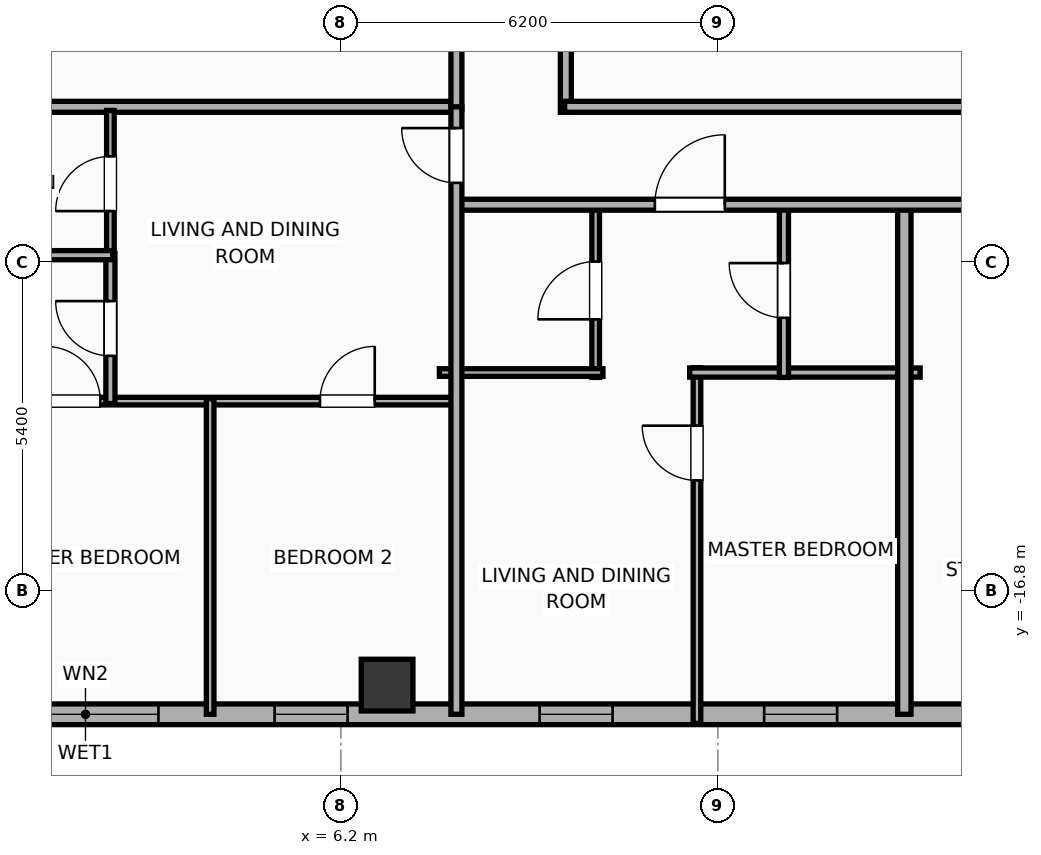
"""IFC4 building model, lengths in metres.
Left out: names, types, materials, properties, quantities, classifications, styles, units other than length and angle.
Written with IfcOpenShell. Run it as: python <this file> out.ifc"""

import sys

from ifc_helpers import new_model, si_unit, direction, frame, frame_2d, origin, origin_2d, place, context, subcontext, project, spatial, rectangle, hollow_rectangle, extrude, element, fill, save


model = new_model("IFC4")
c1 = context("Model", 3, precision=1e-05, world=origin(), true_north=direction((0.0, 1.0)))
c2 = subcontext(c1, "Body", "Model", "MODEL_VIEW")
j1 = project(units=[si_unit("LENGTHUNIT", "METRE"), si_unit("PLANEANGLEUNIT", "RADIAN")], contexts=[c1])
p1 = place(None, origin())
s1 = spatial("IfcSite", under=j1, at=p1, CompositionType="ELEMENT")
p2 = place(p1, origin())
s2 = spatial("IfcBuilding", under=s1, at=p2, CompositionType="ELEMENT")
p3 = place(p2, frame((0.0, 0.0, 227.5)))
s3 = spatial("IfcBuildingStorey", under=s2, at=p3, CompositionType="ELEMENT", Elevation=227.5)
p4 = place(p3, frame((6.96, -18.35, 0.0), z_axis=(0.0, 0.0, 1.0), x_axis=(1.0, 0.0, 0.0)))
e1 = element("IfcColumn", 1, at=p4, inside=s3, PredefinedType="COLUMN", context=c2, shape_type="SweptSolid", body=[
    extrude(hollow_rectangle(XDim=0.85, YDim=0.85, WallThickness=0.028, at=origin_2d()), origin(), (0.0, 0.0, 1.0), 3.9),
])
p5 = place(p3, frame((26.783, -18.83, 0.0), z_axis=(0.0, 0.0, 1.0), x_axis=(-1.0, 0.0, 0.0)))
e2 = element("IfcWall", 2, at=p5, inside=s3, PredefinedType="ELEMENTEDWALL", context=c2, shape_type="SweptSolid", body=[
    extrude(rectangle(XDim=49.566, YDim=0.34, at=frame_2d((24.783, 0.0))), origin(), (0.0, 0.0, 1.0), 3.65),
])
p6 = place(p5, frame((23.583, 0.0, 0.75)))
e3 = element("IfcOpeningElement", 3, at=p6, cuts=e2, PredefinedType="OPENING", context=c2, shape_type="SweptSolid", body=[
    extrude(rectangle(XDim=2.4, YDim=2.1, at=frame_2d((1.2, 1.05))), frame((0.0, 0.18, 0.0), z_axis=(0.0, -1.0, 0.0), x_axis=(1.0, 0.0, 0.0)), (0.0, 0.0, 1.0), 0.36),
])
p7 = place(p5, frame((41.756, 0.0, 0.75)))
e4 = element("IfcOpeningElement", 4, at=p7, cuts=e2, PredefinedType="OPENING", context=c2, shape_type="SweptSolid", body=[
    extrude(rectangle(XDim=2.4, YDim=2.1, at=frame_2d((1.2, 1.05))), frame((0.0, 0.18, 0.0), z_axis=(0.0, -1.0, 0.0), x_axis=(1.0, 0.0, 0.0)), (0.0, 0.0, 1.0), 0.36),
])
p8 = place(p5, frame((47.222, 0.0, 0.75)))
e5 = element("IfcOpeningElement", 5, at=p8, cuts=e2, PredefinedType="OPENING", context=c2, shape_type="SweptSolid", body=[
    extrude(rectangle(XDim=1.2, YDim=2.05, at=frame_2d((0.6, 1.025))), frame((0.0, 0.18, 0.0), z_axis=(0.0, -1.0, 0.0), x_axis=(1.0, 0.0, 0.0)), (0.0, 0.0, 1.0), 0.36),
])
p9 = place(p5, frame((45.181, 0.0, 0.75)))
e6 = element("IfcOpeningElement", 6, at=p9, cuts=e2, PredefinedType="OPENING", context=c2, shape_type="SweptSolid", body=[
    extrude(rectangle(XDim=1.2, YDim=2.05, at=frame_2d((0.6, 1.025))), frame((0.0, 0.18, 0.0), z_axis=(0.0, -1.0, 0.0), x_axis=(1.0, 0.0, 0.0)), (0.0, 0.0, 1.0), 0.36),
])
p10 = place(p5, frame((37.289, 0.0, 0.75)))
e7 = element("IfcOpeningElement", 7, at=p10, cuts=e2, PredefinedType="OPENING", context=c2, shape_type="SweptSolid", body=[
    extrude(rectangle(XDim=1.2, YDim=2.05, at=frame_2d((0.6, 1.025))), frame((0.0, 0.18, 0.0), z_axis=(0.0, -1.0, 0.0), x_axis=(1.0, 0.0, 0.0)), (0.0, 0.0, 1.0), 0.36),
])
p11 = place(p5, frame((16.115, 0.0, 0.75)))
e8 = element("IfcOpeningElement", 8, at=p11, cuts=e2, PredefinedType="OPENING", context=c2, shape_type="SweptSolid", body=[
    extrude(rectangle(XDim=1.2, YDim=2.05, at=frame_2d((0.6, 1.025))), frame((0.0, 0.18, 0.0), z_axis=(0.0, -1.0, 0.0), x_axis=(1.0, 0.0, 0.0)), (0.0, 0.0, 1.0), 0.36),
])
p12 = place(p5, frame((12.422, 0.0, 0.75)))
e9 = element("IfcOpeningElement", 9, at=p12, cuts=e2, PredefinedType="OPENING", context=c2, shape_type="SweptSolid", body=[
    extrude(rectangle(XDim=1.2, YDim=2.05, at=frame_2d((0.6, 1.025))), frame((0.0, 0.18, 0.0), z_axis=(0.0, -1.0, 0.0), x_axis=(1.0, 0.0, 0.0)), (0.0, 0.0, 1.0), 0.36),
])
p13 = place(p5, frame((8.09, 0.0, 0.75)))
e10 = element("IfcOpeningElement", 10, at=p13, cuts=e2, PredefinedType="OPENING", context=c2, shape_type="SweptSolid", body=[
    extrude(rectangle(XDim=1.2, YDim=2.05, at=frame_2d((0.6, 1.025))), frame((0.0, 0.18, 0.0), z_axis=(0.0, -1.0, 0.0), x_axis=(1.0, 0.0, 0.0)), (0.0, 0.0, 1.0), 0.36),
])
p14 = place(p5, frame((4.637, 0.0, 0.75)))
e11 = element("IfcOpeningElement", 11, at=p14, cuts=e2, PredefinedType="OPENING", context=c2, shape_type="SweptSolid", body=[
    extrude(rectangle(XDim=1.2, YDim=2.05, at=frame_2d((0.6, 1.025))), frame((0.0, 0.18, 0.0), z_axis=(0.0, -1.0, 0.0), x_axis=(1.0, 0.0, 0.0)), (0.0, 0.0, 1.0), 0.36),
])
p15 = place(p5, frame((1.811, 0.0, 0.75)))
e12 = element("IfcOpeningElement", 12, at=p15, cuts=e2, PredefinedType="OPENING", context=c2, shape_type="SweptSolid", body=[
    extrude(rectangle(XDim=1.2, YDim=2.05, at=frame_2d((0.6, 1.025))), frame((0.0, 0.18, 0.0), z_axis=(0.0, -1.0, 0.0), x_axis=(1.0, 0.0, 0.0)), (0.0, 0.0, 1.0), 0.36),
])
p16 = place(p5, frame((32.253, 0.0, 0.75)))
e13 = element("IfcOpeningElement", 13, at=p16, cuts=e2, PredefinedType="OPENING", context=c2, shape_type="SweptSolid", body=[
    extrude(rectangle(XDim=1.2, YDim=2.05, at=frame_2d((0.6, 1.025))), frame((0.0, 0.18, 0.0), z_axis=(0.0, -1.0, 0.0), x_axis=(1.0, 0.0, 0.0)), (0.0, 0.0, 1.0), 0.36),
])
p17 = place(p5, frame((27.853, 0.0, 0.75)))
e14 = element("IfcOpeningElement", 14, at=p17, cuts=e2, PredefinedType="OPENING", context=c2, shape_type="SweptSolid", body=[
    extrude(rectangle(XDim=1.2, YDim=2.05, at=frame_2d((0.6, 1.025))), frame((0.0, 0.18, 0.0), z_axis=(0.0, -1.0, 0.0), x_axis=(1.0, 0.0, 0.0)), (0.0, 0.0, 1.0), 0.36),
])
p18 = place(p5, frame((20.473, 0.0, 0.75)))
e15 = element("IfcOpeningElement", 15, at=p18, cuts=e2, PredefinedType="OPENING", context=c2, shape_type="SweptSolid", body=[
    extrude(rectangle(XDim=1.2, YDim=2.05, at=frame_2d((0.6, 1.025))), frame((0.0, 0.18, 0.0), z_axis=(0.0, -1.0, 0.0), x_axis=(1.0, 0.0, 0.0)), (0.0, 0.0, 1.0), 0.36),
])
p19 = place(p3, frame((9.9, -8.93, 0.0), z_axis=(0.0, 0.0, 1.0), x_axis=(0.0, 1.0, 0.0)))
e16 = element("IfcWall", 16, at=p19, inside=s3, PredefinedType="PARTITIONING", context=c2, shape_type="SweptSolid", body=[
    extrude(rectangle(XDim=17.86, YDim=0.18, at=frame_2d((8.93, 0.0))), origin(), (0.0, 0.0, 1.0), 3.65),
])
p20 = place(p19, frame((7.487, 0.0, 0.0)))
e17 = element("IfcOpeningElement", 17, at=p20, cuts=e16, PredefinedType="OPENING", context=c2, shape_type="SweptSolid", body=[
    extrude(rectangle(XDim=1.1, YDim=2.05, at=frame_2d((0.55, 1.025))), frame((0.0, 0.1, 0.0), z_axis=(0.0, -1.0, 0.0), x_axis=(1.0, 0.0, 0.0)), (0.0, 0.0, 1.0), 0.2),
])
p21 = place(p3, frame((9.88, -8.84, 0.0), z_axis=(0.0, 0.0, 1.0), x_axis=(1.0, 0.0, 0.0)))
e18 = element("IfcWall", 18, at=p21, inside=s3, PredefinedType="PARTITIONING", context=c2, shape_type="SweptSolid", body=[
    extrude(rectangle(XDim=20.35, YDim=0.18, at=frame_2d((10.175, 0.0))), origin(), (0.0, 0.0, 1.0), 3.65),
])
p22 = place(p3, frame((-8.15, -8.84, 0.0), z_axis=(0.0, 0.0, 1.0), x_axis=(1.0, 0.0, 0.0)))
e19 = element("IfcWall", 19, at=p22, inside=s3, PredefinedType="PARTITIONING", context=c2, shape_type="SweptSolid", body=[
    extrude(rectangle(XDim=16.3, YDim=0.18, at=frame_2d((8.15, 0.0))), origin(), (0.0, 0.0, 1.0), 3.65),
])
p23 = place(p3, frame((8.1, -8.88, 0.0), z_axis=(0.0, 0.0, 1.0), x_axis=(0.0, 1.0, 0.0)))
e20 = element("IfcWall", 20, at=p23, inside=s3, PredefinedType="PARTITIONING", context=c2, shape_type="SweptSolid", body=[
    extrude(rectangle(XDim=17.76, YDim=0.18, at=frame_2d((8.88, 0.0))), origin(), (0.0, 0.0, 1.0), 3.65),
])
p24 = place(p3, frame((12.056, -18.98, 0.0), z_axis=(0.0, 0.0, 1.0), x_axis=(0.0, 1.0, 0.0)))
e21 = element("IfcWall", 21, at=p24, inside=s3, PredefinedType="PARTITIONING", context=c2, shape_type="SweptSolid", body=[
    extrude(rectangle(XDim=5.85, YDim=0.125, at=frame_2d((2.925, 0.0))), origin(), (0.0, 0.0, 1.0), 3.65),
])
p25 = place(p24, frame((3.996, 0.0, 0.0)))
e22 = element("IfcOpeningElement", 22, at=p25, cuts=e21, PredefinedType="OPENING", context=c2, shape_type="SweptSolid", body=[
    extrude(rectangle(XDim=0.9, YDim=2.05, at=frame_2d((0.45, 1.025))), frame((0.0, 0.073, 0.0), z_axis=(0.0, -1.0, 0.0), x_axis=(1.0, 0.0, 0.0)), (0.0, 0.0, 1.0), 0.145),
])
p26 = place(p3, frame((11.936, -13.21, 0.0), z_axis=(0.0, 0.0, 1.0), x_axis=(1.0, 0.0, 0.0)))
e23 = element("IfcWall", 23, at=p26, inside=s3, PredefinedType="PLUMBINGWALL", context=c2, shape_type="SweptSolid", body=[
    extrude(rectangle(XDim=3.79, YDim=0.15, at=frame_2d((1.895, 0.0))), origin(), (0.0, 0.0, 1.0), 3.65),
])
p27 = place(p3, frame((10.39, -13.29, 0.0), z_axis=(0.0, 0.0, 1.0), x_axis=(0.0, 1.0, 0.0)))
e24 = element("IfcWall", 24, at=p27, inside=s3, PredefinedType="PARTITIONING", context=c2, shape_type="SweptSolid", body=[
    extrude(rectangle(XDim=2.86, YDim=0.125, at=frame_2d((1.43, 0.0))), origin(), (0.0, 0.0, 1.0), 3.65),
])
p28 = place(p27, frame((0.955, 0.0, 0.0)))
e25 = element("IfcOpeningElement", 25, at=p28, cuts=e24, PredefinedType="OPENING", context=c2, shape_type="SweptSolid", body=[
    extrude(rectangle(XDim=0.95, YDim=2.05, at=frame_2d((0.475, 1.025))), frame((0.0, 0.073, 0.0), z_axis=(0.0, -1.0, 0.0), x_axis=(1.0, 0.0, 0.0)), (0.0, 0.0, 1.0), 0.145),
])
p29 = place(p3, frame((7.82, -13.21, 0.0), z_axis=(0.0, 0.0, 1.0), x_axis=(1.0, 0.0, 0.0)))
e26 = element("IfcWall", 26, at=p29, inside=s3, PredefinedType="PARTITIONING", context=c2, shape_type="SweptSolid", body=[
    extrude(rectangle(XDim=2.69, YDim=0.125, at=frame_2d((1.345, 0.0))), origin(), (0.0, 0.0, 1.0), 3.65),
])
p30 = place(p3, frame((13.486, -13.29, 0.0), z_axis=(0.0, 0.0, 1.0), x_axis=(0.0, 1.0, 0.0)))
e27 = element("IfcWall", 27, at=p30, inside=s3, PredefinedType="PLUMBINGWALL", context=c2, shape_type="SweptSolid", body=[
    extrude(rectangle(XDim=2.86, YDim=0.15, at=frame_2d((1.43, 0.0))), origin(), (0.0, 0.0, 1.0), 3.65),
])
p31 = place(p30, frame((0.98, 0.0, 0.0)))
e28 = element("IfcOpeningElement", 28, at=p31, cuts=e27, PredefinedType="OPENING", context=c2, shape_type="SweptSolid", body=[
    extrude(rectangle(XDim=0.9, YDim=2.05, at=frame_2d((0.45, 1.025))), frame((0.0, 0.085, 0.0), z_axis=(0.0, -1.0, 0.0), x_axis=(1.0, 0.0, 0.0)), (0.0, 0.0, 1.0), 0.17),
])
p32 = place(p3, frame((15.466, -18.83, 0.0), z_axis=(0.0, 0.0, 1.0), x_axis=(0.0, 1.0, 0.0)))
e29 = element("IfcWall", 29, at=p32, inside=s3, PredefinedType="PARTITIONING", context=c2, shape_type="SweptSolid", body=[
    extrude(rectangle(XDim=8.46, YDim=0.22, at=frame_2d((4.23, 0.0))), origin(), (0.0, 0.0, 1.0), 3.65),
])
p33 = place(p3, frame((8.08, -10.45, 0.0), z_axis=(0.0, 0.0, 1.0), x_axis=(1.0, 0.0, 0.0)))
e30 = element("IfcWall", 30, at=p33, inside=s3, PredefinedType="PARTITIONING", context=c2, shape_type="SweptSolid", body=[
    extrude(rectangle(XDim=22.15, YDim=0.18, at=frame_2d((11.075, 0.0))), origin(), (0.0, 0.0, 1.0), 3.65),
])
p34 = place(p33, frame((3.283, 0.0, 0.0)))
e31 = element("IfcOpeningElement", 31, at=p34, cuts=e30, PredefinedType="OPENING", context=c2, shape_type="SweptSolid", body=[
    extrude(rectangle(XDim=1.15, YDim=2.05, at=frame_2d((0.575, 1.025))), frame((0.0, 0.1, 0.0), z_axis=(0.0, -1.0, 0.0), x_axis=(1.0, 0.0, 0.0)), (0.0, 0.0, 1.0), 0.2),
])
p35 = place(p33, frame((9.229, 0.0, 0.0)))
e32 = element("IfcOpeningElement", 32, at=p35, cuts=e30, PredefinedType="OPENING", context=c2, shape_type="SweptSolid", body=[
    extrude(rectangle(XDim=1.15, YDim=2.05, at=frame_2d((0.575, 1.025))), frame((0.0, 0.1, 0.0), z_axis=(0.0, -1.0, 0.0), x_axis=(1.0, 0.0, 0.0)), (0.0, 0.0, 1.0), 0.2),
])
p36 = place(p33, frame((18.084, 0.0, 0.0)))
e33 = element("IfcOpeningElement", 33, at=p36, cuts=e30, PredefinedType="OPENING", context=c2, shape_type="SweptSolid", body=[
    extrude(rectangle(XDim=1.15, YDim=2.05, at=frame_2d((0.575, 1.025))), frame((0.0, 0.1, 0.0), z_axis=(0.0, -1.0, 0.0), x_axis=(1.0, 0.0, 0.0)), (0.0, 0.0, 1.0), 0.2),
])
p37 = place(p3, frame((0.02, -13.68, 0.0), z_axis=(0.0, 0.0, 1.0), x_axis=(1.0, 0.0, 0.0)))
e34 = element("IfcWall", 34, at=p37, inside=s3, PredefinedType="PARTITIONING", context=c2, shape_type="SweptSolid", body=[
    extrude(rectangle(XDim=8.06, YDim=0.125, at=frame_2d((4.03, 0.0))), origin(), (0.0, 0.0, 1.0), 3.65),
])
p38 = place(p37, frame((1.323, 0.0, 0.0)))
e35 = element("IfcOpeningElement", 35, at=p38, cuts=e34, PredefinedType="OPENING", context=c2, shape_type="SweptSolid", body=[
    extrude(rectangle(XDim=0.9, YDim=2.05, at=frame_2d((0.45, 1.025))), frame((0.0, 0.073, 0.0), z_axis=(0.0, -1.0, 0.0), x_axis=(1.0, 0.0, 0.0)), (0.0, 0.0, 1.0), 0.145),
])
p39 = place(p37, frame((5.837, 0.0, 0.0)))
e36 = element("IfcOpeningElement", 36, at=p39, cuts=e34, PredefinedType="OPENING", context=c2, shape_type="SweptSolid", body=[
    extrude(rectangle(XDim=0.9, YDim=2.05, at=frame_2d((0.45, 1.025))), frame((0.0, 0.073, 0.0), z_axis=(0.0, -1.0, 0.0), x_axis=(1.0, 0.0, 0.0)), (0.0, 0.0, 1.0), 0.145),
])
p40 = place(p3, frame((2.41, -11.31, 0.0), z_axis=(0.0, 0.0, 1.0), x_axis=(0.0, 1.0, 0.0)))
e37 = element("IfcWall", 37, at=p40, inside=s3, PredefinedType="PARTITIONING", context=c2, shape_type="SweptSolid", body=[
    extrude(rectangle(XDim=2.41, YDim=0.125, at=frame_2d((1.205, 0.0))), origin(), (0.0, 0.0, 1.0), 3.65),
])
p41 = place(p40, frame((0.755, 0.0, 0.0)))
e38 = element("IfcOpeningElement", 38, at=p41, cuts=e37, PredefinedType="OPENING", context=c2, shape_type="SweptSolid", body=[
    extrude(rectangle(XDim=0.9, YDim=2.05, at=frame_2d((0.45, 1.025))), frame((0.0, 0.073, 0.0), z_axis=(0.0, -1.0, 0.0), x_axis=(1.0, 0.0, 0.0)), (0.0, 0.0, 1.0), 0.145),
])
p42 = place(p3, frame((2.41, -13.72, 0.0), z_axis=(0.0, 0.0, 1.0), x_axis=(0.0, 1.0, 0.0)))
e39 = element("IfcWall", 39, at=p42, inside=s3, PredefinedType="PLUMBINGWALL", context=c2, shape_type="SweptSolid", body=[
    extrude(rectangle(XDim=2.47, YDim=0.15, at=frame_2d((1.235, 0.0))), origin(), (0.0, 0.0, 1.0), 3.65),
])
p43 = place(p42, frame((0.785, 0.0, 0.0)))
e40 = element("IfcOpeningElement", 40, at=p43, cuts=e39, PredefinedType="OPENING", context=c2, shape_type="SweptSolid", body=[
    extrude(rectangle(XDim=0.9, YDim=2.05, at=frame_2d((0.45, 1.025))), frame((0.0, 0.085, 0.0), z_axis=(0.0, -1.0, 0.0), x_axis=(1.0, 0.0, 0.0)), (0.0, 0.0, 1.0), 0.17),
])
p44 = place(p3, frame((0.02, -11.28, 0.0), z_axis=(0.0, 0.0, 1.0), x_axis=(1.0, 0.0, 0.0)))
e41 = element("IfcWall", 41, at=p44, inside=s3, PredefinedType="PLUMBINGWALL", context=c2, shape_type="SweptSolid", body=[
    extrude(rectangle(XDim=2.43, YDim=0.15, at=frame_2d((1.215, 0.0))), origin(), (0.0, 0.0, 1.0), 3.65),
])
p45 = place(p3, frame((4.05, -18.83, 0.0), z_axis=(0.0, 0.0, 1.0), x_axis=(0.0, 1.0, 0.0)))
e42 = element("IfcWall", 42, at=p45, inside=s3, PredefinedType="PARTITIONING", context=c2, shape_type="SweptSolid", body=[
    extrude(rectangle(XDim=5.19, YDim=0.125, at=frame_2d((2.595, 0.0))), origin(), (0.0, 0.0, 1.0), 3.65),
])
p46 = place(p3, frame((8.1, -18.83, 0.0), z_axis=(0.0, 0.0, 1.0), x_axis=(0.0, 1.0, 0.0)))
e43 = element("IfcWall", 43, at=p46, inside=s3, PredefinedType="PARTITIONING", context=c2, shape_type="SweptSolid", body=[
    extrude(rectangle(XDim=9.99, YDim=0.18, at=frame_2d((4.995, 0.0))), origin(), (0.0, 0.0, 1.0), 3.65),
])
p47 = place(p46, frame((8.74, 0.0, 0.0)))
e44 = element("IfcOpeningElement", 44, at=p47, cuts=e43, PredefinedType="OPENING", context=c2, shape_type="SweptSolid", body=[
    extrude(rectangle(XDim=0.9, YDim=2.05, at=frame_2d((0.45, 1.025))), frame((0.0, 0.1, 0.0), z_axis=(0.0, -1.0, 0.0), x_axis=(1.0, 0.0, 0.0)), (0.0, 0.0, 1.0), 0.2),
])
p48 = place(p6, origin())
e45 = element("IfcWindow", 45, at=p48, inside=s3, PartitioningType="SINGLE_PANEL", PredefinedType="WINDOW", context=c2, shape_type="SweptSolid", body=[
    extrude(rectangle(XDim=2.4, YDim=2.1, at=frame_2d((1.2, 1.05))), frame((0.0, 0.03, 0.0), z_axis=(0.0, -1.0, 0.0), x_axis=(1.0, 0.0, 0.0)), (0.0, 0.0, 1.0), 0.06),
])
fill(e3, e45)
p49 = place(p11, origin())
e46 = element("IfcWindow", 46, at=p49, inside=s3, PartitioningType="SINGLE_PANEL", PredefinedType="WINDOW", context=c2, shape_type="SweptSolid", body=[
    extrude(rectangle(XDim=1.2, YDim=2.05, at=frame_2d((0.6, 1.025))), frame((0.0, 0.03, 0.0), z_axis=(0.0, -1.0, 0.0), x_axis=(1.0, 0.0, 0.0)), (0.0, 0.0, 1.0), 0.06),
])
fill(e8, e46)
p50 = place(p12, origin())
e47 = element("IfcWindow", 47, at=p50, inside=s3, PartitioningType="SINGLE_PANEL", PredefinedType="WINDOW", context=c2, shape_type="SweptSolid", body=[
    extrude(rectangle(XDim=1.2, YDim=2.05, at=frame_2d((0.6, 1.025))), frame((0.0, 0.03, 0.0), z_axis=(0.0, -1.0, 0.0), x_axis=(1.0, 0.0, 0.0)), (0.0, 0.0, 1.0), 0.06),
])
fill(e9, e47)
p51 = place(p18, origin())
e48 = element("IfcWindow", 48, at=p51, inside=s3, PartitioningType="SINGLE_PANEL", PredefinedType="WINDOW", context=c2, shape_type="SweptSolid", body=[
    extrude(rectangle(XDim=1.2, YDim=2.05, at=frame_2d((0.6, 1.025))), frame((0.0, 0.03, 0.0), z_axis=(0.0, -1.0, 0.0), x_axis=(1.0, 0.0, 0.0)), (0.0, 0.0, 1.0), 0.06),
])
fill(e15, e48)
p52 = place(p25, origin())
e49 = element("IfcDoor", 49, at=p52, inside=s3, OperationType="SINGLE_SWING_RIGHT", PredefinedType="DOOR", context=c2, shape_type="SweptSolid", body=[
    extrude(rectangle(XDim=0.9, YDim=2.05, at=frame_2d((0.45, 1.025))), frame((0.0, 0.025, 0.0), z_axis=(0.0, -1.0, 0.0), x_axis=(1.0, 0.0, 0.0)), (0.0, 0.0, 1.0), 0.05),
])
fill(e22, e49)
p53 = place(p28, origin())
e50 = element("IfcDoor", 50, at=p53, inside=s3, OperationType="SINGLE_SWING_LEFT", PredefinedType="DOOR", context=c2, shape_type="SweptSolid", body=[
    extrude(rectangle(XDim=0.95, YDim=2.05, at=frame_2d((0.475, 1.025))), frame((0.0, 0.025, 0.0), z_axis=(0.0, -1.0, 0.0), x_axis=(1.0, 0.0, 0.0)), (0.0, 0.0, 1.0), 0.05),
])
fill(e25, e50)
p54 = place(p31, origin())
e51 = element("IfcDoor", 51, at=p54, inside=s3, OperationType="SINGLE_SWING_RIGHT", PredefinedType="DOOR", context=c2, shape_type="SweptSolid", body=[
    extrude(rectangle(XDim=0.9, YDim=2.05, at=frame_2d((0.45, 1.025))), frame((0.0, 0.025, 0.0), z_axis=(0.0, -1.0, 0.0), x_axis=(1.0, 0.0, 0.0)), (0.0, 0.0, 1.0), 0.05),
])
fill(e28, e51)
p55 = place(p34, origin())
e52 = element("IfcDoor", 52, at=p55, inside=s3, OperationType="SINGLE_SWING_RIGHT", PredefinedType="DOOR", context=c2, shape_type="SweptSolid", body=[
    extrude(rectangle(XDim=1.15, YDim=2.05, at=frame_2d((0.575, 1.025))), frame((0.0, 0.025, 0.0), z_axis=(0.0, -1.0, 0.0), x_axis=(1.0, 0.0, 0.0)), (0.0, 0.0, 1.0), 0.05),
])
fill(e31, e52)
p56 = place(p38, origin())
e53 = element("IfcDoor", 53, at=p56, inside=s3, OperationType="SINGLE_SWING_LEFT", PredefinedType="DOOR", context=c2, shape_type="SweptSolid", body=[
    extrude(rectangle(XDim=0.9, YDim=2.05, at=frame_2d((0.45, 1.025))), frame((0.0, 0.025, 0.0), z_axis=(0.0, -1.0, 0.0), x_axis=(1.0, 0.0, 0.0)), (0.0, 0.0, 1.0), 0.05),
])
fill(e35, e53)
p57 = place(p39, origin())
e54 = element("IfcDoor", 54, at=p57, inside=s3, OperationType="SINGLE_SWING_RIGHT", PredefinedType="DOOR", context=c2, shape_type="SweptSolid", body=[
    extrude(rectangle(XDim=0.9, YDim=2.05, at=frame_2d((0.45, 1.025))), frame((0.0, 0.025, 0.0), z_axis=(0.0, -1.0, 0.0), x_axis=(1.0, 0.0, 0.0)), (0.0, 0.0, 1.0), 0.05),
])
fill(e36, e54)
p58 = place(p41, origin())
e55 = element("IfcDoor", 55, at=p58, inside=s3, OperationType="SINGLE_SWING_LEFT", PredefinedType="DOOR", context=c2, shape_type="SweptSolid", body=[
    extrude(rectangle(XDim=0.9, YDim=2.05, at=frame_2d((0.45, 1.025))), frame((0.0, 0.025, 0.0), z_axis=(0.0, -1.0, 0.0), x_axis=(1.0, 0.0, 0.0)), (0.0, 0.0, 1.0), 0.05),
])
fill(e38, e55)
p59 = place(p43, origin())
e56 = element("IfcDoor", 56, at=p59, inside=s3, OperationType="SINGLE_SWING_RIGHT", PredefinedType="DOOR", context=c2, shape_type="SweptSolid", body=[
    extrude(rectangle(XDim=0.9, YDim=2.05, at=frame_2d((0.45, 1.025))), frame((0.0, 0.025, 0.0), z_axis=(0.0, -1.0, 0.0), x_axis=(1.0, 0.0, 0.0)), (0.0, 0.0, 1.0), 0.05),
])
fill(e40, e56)
p60 = place(p47, origin())
e57 = element("IfcDoor", 57, at=p60, inside=s3, OperationType="SINGLE_SWING_RIGHT", PredefinedType="DOOR", context=c2, shape_type="SweptSolid", body=[
    extrude(rectangle(XDim=0.9, YDim=2.05, at=frame_2d((0.45, 1.025))), frame((0.0, 0.025, 0.0), z_axis=(0.0, -1.0, 0.0), x_axis=(1.0, 0.0, 0.0)), (0.0, 0.0, 1.0), 0.05),
])
fill(e44, e57)
save(model, sys.argv[1])
